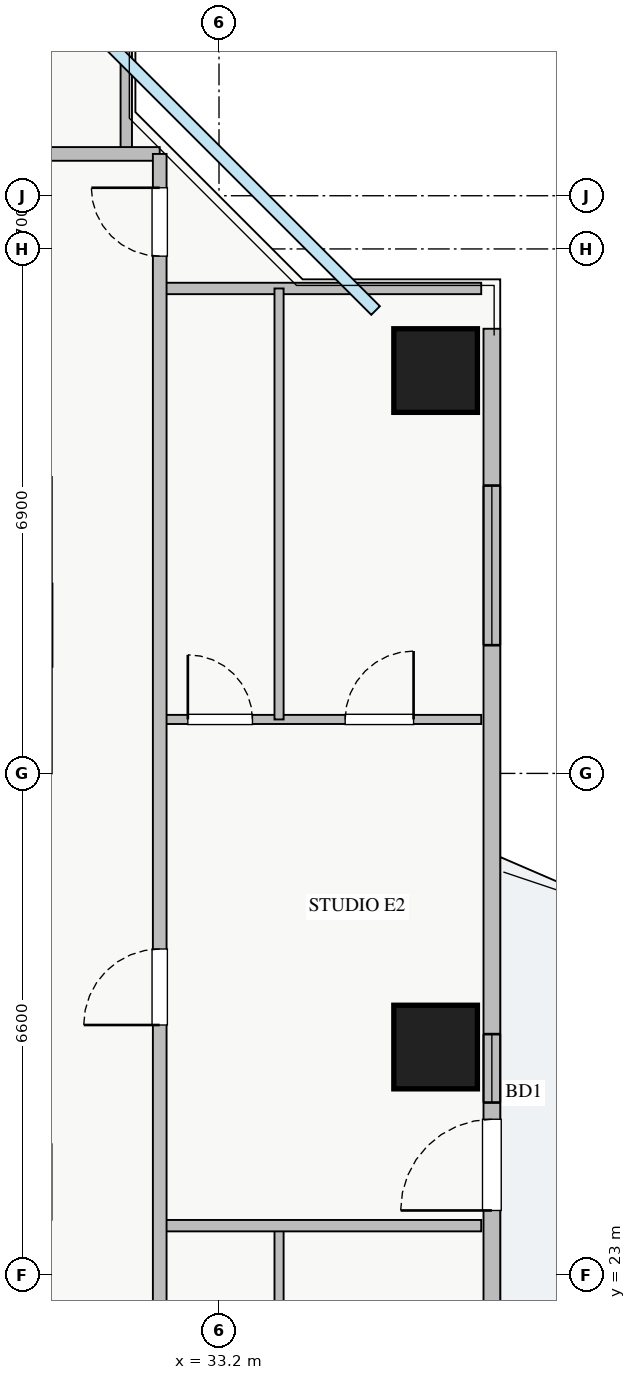
"""IFC4 building model, lengths in metres.
Left out: names, types, materials, properties, quantities, classifications, styles, units other than length and angle.
Written with IfcOpenShell. Run it as: python <this file> out.ifc"""

import sys

from ifc_helpers import new_model, si_unit, direction, frame, frame_2d, origin, origin_2d, place, context, subcontext, project, spatial, rectangle, extrude, source, transform, mapped, element, fill, save


model = new_model("IFC4")
c1 = context("Model", 3, precision=1e-05, world=origin(), true_north=direction((0.0, 1.0)))
c2 = subcontext(c1, "Body", "Model", "MODEL_VIEW")
j1 = project(units=[si_unit("LENGTHUNIT", "METRE"), si_unit("PLANEANGLEUNIT", "RADIAN")], contexts=[c1])
p1 = place(None, origin())
s1 = spatial("IfcSite", under=j1, at=p1, CompositionType="ELEMENT")
p2 = place(p1, origin())
s2 = spatial("IfcBuilding", under=s1, at=p2, CompositionType="ELEMENT")
p3 = place(p2, frame((0.0, 0.0, 119.75)))
s3 = spatial("IfcBuildingStorey", under=s2, at=p3, CompositionType="ELEMENT", Elevation=119.75)
m1 = source(origin(), c2, "Body", "SweptSolid", [
    extrude(rectangle(XDim=1.1, YDim=1.1, at=origin_2d()), origin(), (0.0, 0.0, 1.0), 3.25),
])
for number, where, z_axis, x_axis in (
    (1, (36.05, 26.0, 0.0), (0.0, 0.0, 1.0), (1.0, 0.0, 0.0)),
    (2, (36.05, 34.9, 0.0), (0.0, 0.0, 1.0), (1.0, 0.0, 0.0)),
):
    element("IfcColumn", number, at=place(p3, frame(where, z_axis=z_axis, x_axis=x_axis)), inside=s3, PredefinedType="COLUMN", context=c2, shape_type="MappedRepresentation", body=[
        mapped(m1, transform((0.0, 0.0, 0.0), x_axis=(1.0, 0.0, 0.0), y_axis=(0.0, 1.0, 0.0), z_axis=(0.0, 0.0, 1.0), scale=1.0)),
    ])
p4 = place(p3, frame((36.79, 10.55, 0.0), z_axis=(0.0, 0.0, 1.0), x_axis=(0.0, 1.0, 0.0)))
e3 = element("IfcWall", 3, at=p4, inside=s3, PredefinedType="STANDARD", context=c2, shape_type="SweptSolid", body=[
    extrude(rectangle(XDim=24.9, YDim=0.22, at=frame_2d((12.45, 0.0))), origin(), (0.0, 0.0, 1.0), 2.61),
])
p5 = place(p4, frame((13.3, 0.0, 0.0)))
e4 = element("IfcOpeningElement", 4, at=p5, cuts=e3, PredefinedType="OPENING", context=c2, shape_type="SweptSolid", body=[
    extrude(rectangle(XDim=1.2, YDim=2.1, at=frame_2d((0.6, 1.05))), frame((0.0, 0.12, 0.0), z_axis=(0.0, -1.0, 0.0), x_axis=(1.0, 0.0, 0.0)), (0.0, 0.0, 1.0), 0.24),
])
p6 = place(p4, frame((1.912, 0.0, 0.9)))
e5 = element("IfcOpeningElement", 5, at=p6, cuts=e3, PredefinedType="OPENING", context=c2, shape_type="SweptSolid", body=[
    extrude(rectangle(XDim=2.4, YDim=1.48, at=frame_2d((1.2, 0.74))), frame((0.0, 0.12, 0.0), z_axis=(0.0, -1.0, 0.0), x_axis=(1.0, 0.0, 0.0)), (0.0, 0.0, 1.0), 0.24),
])
p7 = place(p4, frame((20.737, 0.0, 0.9)))
e6 = element("IfcOpeningElement", 6, at=p7, cuts=e3, PredefinedType="OPENING", context=c2, shape_type="SweptSolid", body=[
    extrude(rectangle(XDim=2.1, YDim=1.48, at=frame_2d((1.05, 0.74))), frame((0.0, 0.12, 0.0), z_axis=(0.0, -1.0, 0.0), x_axis=(1.0, 0.0, 0.0)), (0.0, 0.0, 1.0), 0.24),
])
p8 = place(p4, frame((14.72, 0.0, 0.9)))
e7 = element("IfcOpeningElement", 7, at=p8, cuts=e3, PredefinedType="OPENING", context=c2, shape_type="SweptSolid", body=[
    extrude(rectangle(XDim=0.9, YDim=1.2, at=frame_2d((0.45, 0.6))), frame((0.0, 0.12, 0.0), z_axis=(0.0, -1.0, 0.0), x_axis=(1.0, 0.0, 0.0)), (0.0, 0.0, 1.0), 0.24),
])
p9 = place(p3, frame((31.98, 37.75, 0.0), z_axis=(0.0, 0.0, 1.0), x_axis=(0.0, 1.0, 0.0)))
e8 = element("IfcWall", 8, at=p9, inside=s3, PredefinedType="PARTITIONING", context=c2, shape_type="SweptSolid", body=[
    extrude(rectangle(XDim=2.9, YDim=0.15, at=frame_2d((1.45, 0.0))), origin(), (0.0, 0.0, 1.0), 3.07),
])
p10 = place(p3, frame((8.85, 37.75, 0.0), z_axis=(0.0, 0.0, 1.0), x_axis=(1.0, 0.0, 0.0)))
e9 = element("IfcWall", 9, at=p10, inside=s3, PredefinedType="PARTITIONING", context=c2, shape_type="SweptSolid", body=[
    extrude(rectangle(XDim=23.57, YDim=0.18, at=frame_2d((11.785, 0.0))), origin(), (0.0, 0.0, 1.0), 3.07),
])
p11 = place(p10, frame((2.035, 0.0, 0.0)))
e10 = element("IfcOpeningElement", 10, at=p11, cuts=e9, PredefinedType="OPENING", context=c2, shape_type="SweptSolid", body=[
    extrude(rectangle(XDim=1.0, YDim=2.05, at=frame_2d((0.5, 1.025))), frame((0.0, 0.1, 0.0), z_axis=(0.0, -1.0, 0.0), x_axis=(1.0, 0.0, 0.0)), (0.0, 0.0, 1.0), 0.2),
])
p12 = place(p10, frame((7.16, 0.0, 0.0)))
e11 = element("IfcOpeningElement", 11, at=p12, cuts=e9, PredefinedType="OPENING", context=c2, shape_type="SweptSolid", body=[
    extrude(rectangle(XDim=1.0, YDim=2.05, at=frame_2d((0.5, 1.025))), frame((0.0, 0.1, 0.0), z_axis=(0.0, -1.0, 0.0), x_axis=(1.0, 0.0, 0.0)), (0.0, 0.0, 1.0), 0.2),
])
p13 = place(p10, frame((13.3, 0.0, 0.0)))
e12 = element("IfcOpeningElement", 12, at=p13, cuts=e9, PredefinedType="OPENING", context=c2, shape_type="SweptSolid", body=[
    extrude(rectangle(XDim=1.0, YDim=2.05, at=frame_2d((0.5, 1.025))), frame((0.0, 0.1, 0.0), z_axis=(0.0, -1.0, 0.0), x_axis=(1.0, 0.0, 0.0)), (0.0, 0.0, 1.0), 0.2),
])
p14 = place(p10, frame((19.74, 0.0, 0.0)))
e13 = element("IfcOpeningElement", 13, at=p14, cuts=e9, PredefinedType="OPENING", context=c2, shape_type="SweptSolid", body=[
    extrude(rectangle(XDim=1.0, YDim=2.05, at=frame_2d((0.5, 1.025))), frame((0.0, 0.1, 0.0), z_axis=(0.0, -1.0, 0.0), x_axis=(1.0, 0.0, 0.0)), (0.0, 0.0, 1.0), 0.2),
])
p15 = place(p3, frame((32.42, 35.98, 0.0), z_axis=(0.0, 0.0, 1.0), x_axis=(1.0, 0.0, 0.0)))
e14 = element("IfcWall", 14, at=p15, inside=s3, PredefinedType="PARTITIONING", context=c2, shape_type="SweptSolid", body=[
    extrude(rectangle(XDim=4.23, YDim=0.15, at=frame_2d((2.115, 0.0))), origin(), (0.0, 0.0, 1.0), 3.07),
])
p16 = place(p3, frame((33.99, 17.38, 0.0), z_axis=(0.0, 0.0, 1.0), x_axis=(0.0, 1.0, 0.0)))
e15 = element("IfcWall", 15, at=p16, inside=s3, PredefinedType="PLUMBINGWALL", context=c2, shape_type="SweptSolid", body=[
    extrude(rectangle(XDim=6.27, YDim=0.12, at=frame_2d((3.135, 0.0))), origin(), (0.0, 0.0, 1.0), 3.07),
])
p17 = place(p3, frame((32.42, 30.31, 0.0), z_axis=(0.0, 0.0, 1.0), x_axis=(1.0, 0.0, 0.0)))
e16 = element("IfcWall", 16, at=p17, inside=s3, PredefinedType="PLUMBINGWALL", context=c2, shape_type="SweptSolid", body=[
    extrude(rectangle(XDim=4.23, YDim=0.12, at=frame_2d((2.115, 0.0))), origin(), (0.0, 0.0, 1.0), 3.07),
])
p18 = place(p17, frame((0.37, 0.0, 0.0)))
e17 = element("IfcOpeningElement", 17, at=p18, cuts=e16, PredefinedType="OPENING", context=c2, shape_type="SweptSolid", body=[
    extrude(rectangle(XDim=0.85, YDim=2.05, at=frame_2d((0.425, 1.025))), frame((0.0, 0.07, 0.0), z_axis=(0.0, -1.0, 0.0), x_axis=(1.0, 0.0, 0.0)), (0.0, 0.0, 1.0), 0.14),
])
p19 = place(p17, frame((2.44, 0.0, 0.0)))
e18 = element("IfcOpeningElement", 18, at=p19, cuts=e16, PredefinedType="OPENING", context=c2, shape_type="SweptSolid", body=[
    extrude(rectangle(XDim=0.9, YDim=2.05, at=frame_2d((0.45, 1.025))), frame((0.0, 0.07, 0.0), z_axis=(0.0, -1.0, 0.0), x_axis=(1.0, 0.0, 0.0)), (0.0, 0.0, 1.0), 0.14),
])
p20 = place(p3, frame((33.99, 30.31, 0.0), z_axis=(0.0, 0.0, 1.0), x_axis=(0.0, 1.0, 0.0)))
e19 = element("IfcWall", 19, at=p20, inside=s3, PredefinedType="PLUMBINGWALL", context=c2, shape_type="SweptSolid", body=[
    extrude(rectangle(XDim=5.67, YDim=0.12, at=frame_2d((2.835, 0.0))), origin(), (0.0, 0.0, 1.0), 3.07),
])
p21 = place(p3, frame((32.42, 23.65, 0.0), z_axis=(0.0, 0.0, 1.0), x_axis=(1.0, 0.0, 0.0)))
e20 = element("IfcWall", 20, at=p21, inside=s3, PredefinedType="PARTITIONING", context=c2, shape_type="SweptSolid", body=[
    extrude(rectangle(XDim=4.23, YDim=0.15, at=frame_2d((2.115, 0.0))), origin(), (0.0, 0.0, 1.0), 3.07),
])
p22 = place(p3, frame((32.42, 8.25, 0.0), z_axis=(0.0, 0.0, 1.0), x_axis=(0.0, 1.0, 0.0)))
e21 = element("IfcWall", 21, at=p22, inside=s3, PredefinedType="PARTITIONING", context=c2, shape_type="SweptSolid", body=[
    extrude(rectangle(XDim=29.5, YDim=0.18, at=frame_2d((14.75, 0.0))), origin(), (0.0, 0.0, 1.0), 3.07),
])
p23 = place(p22, frame((28.155, 0.0, 0.0)))
e22 = element("IfcOpeningElement", 22, at=p23, cuts=e21, PredefinedType="OPENING", context=c2, shape_type="SweptSolid", body=[
    extrude(rectangle(XDim=0.9, YDim=2.05, at=frame_2d((0.45, 1.025))), frame((0.0, 0.1, 0.0), z_axis=(0.0, -1.0, 0.0), x_axis=(1.0, 0.0, 0.0)), (0.0, 0.0, 1.0), 0.2),
])
p24 = place(p22, frame((0.445, 0.0, 0.0)))
e23 = element("IfcOpeningElement", 23, at=p24, cuts=e21, PredefinedType="OPENING", context=c2, shape_type="SweptSolid", body=[
    extrude(rectangle(XDim=0.9, YDim=2.05, at=frame_2d((0.45, 1.025))), frame((0.0, 0.1, 0.0), z_axis=(0.0, -1.0, 0.0), x_axis=(1.0, 0.0, 0.0)), (0.0, 0.0, 1.0), 0.2),
])
p25 = place(p22, frame((4.76, 0.0, 0.0)))
e24 = element("IfcOpeningElement", 24, at=p25, cuts=e21, PredefinedType="OPENING", context=c2, shape_type="SweptSolid", body=[
    extrude(rectangle(XDim=1.0, YDim=2.05, at=frame_2d((0.5, 1.025))), frame((0.0, 0.1, 0.0), z_axis=(0.0, -1.0, 0.0), x_axis=(1.0, 0.0, 0.0)), (0.0, 0.0, 1.0), 0.2),
])
p26 = place(p22, frame((18.04, 0.0, 0.0)))
e25 = element("IfcOpeningElement", 25, at=p26, cuts=e21, PredefinedType="OPENING", context=c2, shape_type="SweptSolid", body=[
    extrude(rectangle(XDim=1.0, YDim=2.05, at=frame_2d((0.5, 1.025))), frame((0.0, 0.1, 0.0), z_axis=(0.0, -1.0, 0.0), x_axis=(1.0, 0.0, 0.0)), (0.0, 0.0, 1.0), 0.2),
])
m2 = source(origin(), c2, "Body", "SweptSolid", [
    extrude(rectangle(XDim=1.2, YDim=2.1, at=frame_2d((0.6, 1.05))), frame((0.0, 0.025, 0.0), z_axis=(0.0, -1.0, 0.0), x_axis=(1.0, 0.0, 0.0)), (0.0, 0.0, 1.0), 0.05),
])
p27 = place(p5, origin())
e26 = element("IfcDoor", 26, at=p27, inside=s3, OperationType="SINGLE_SWING_LEFT", PredefinedType="DOOR", context=c2, shape_type="MappedRepresentation", body=[
    mapped(m2, transform((0.0, 0.0, 0.0), x_axis=(1.0, 0.0, 0.0), y_axis=(0.0, 1.0, 0.0), z_axis=(0.0, 0.0, 1.0), scale=1.0)),
])
fill(e4, e26)
m3 = source(origin(), c2, "Body", "SweptSolid", [
    extrude(rectangle(XDim=2.1, YDim=1.48, at=frame_2d((1.05, 0.74))), frame((0.0, 0.03, 0.0), z_axis=(0.0, -1.0, 0.0), x_axis=(1.0, 0.0, 0.0)), (0.0, 0.0, 1.0), 0.06),
])
p28 = place(p7, origin())
e27 = element("IfcWindow", 27, at=p28, inside=s3, PartitioningType="TRIPLE_PANEL_VERTICAL", PredefinedType="WINDOW", context=c2, shape_type="MappedRepresentation", body=[
    mapped(m3, transform((0.0, 0.0, 0.0), x_axis=(1.0, 0.0, 0.0), y_axis=(0.0, 1.0, 0.0), z_axis=(0.0, 0.0, 1.0), scale=1.0)),
])
fill(e6, e27)
m4 = source(origin(), c2, "Body", "SweptSolid", [
    extrude(rectangle(XDim=0.85, YDim=2.05, at=frame_2d((0.425, 1.025))), frame((0.0, 0.025, 0.0), z_axis=(0.0, -1.0, 0.0), x_axis=(1.0, 0.0, 0.0)), (0.0, 0.0, 1.0), 0.05),
])
p29 = place(p18, origin())
e28 = element("IfcDoor", 28, at=p29, inside=s3, OperationType="SINGLE_SWING_LEFT", PredefinedType="DOOR", context=c2, shape_type="MappedRepresentation", body=[
    mapped(m4, transform((0.0, 0.0, 0.0), x_axis=(1.0, 0.0, 0.0), y_axis=(0.0, 1.0, 0.0), z_axis=(0.0, 0.0, 1.0), scale=1.0)),
])
fill(e17, e28)
m5 = source(origin(), c2, "Body", "SweptSolid", [
    extrude(rectangle(XDim=0.9, YDim=2.05, at=frame_2d((0.45, 1.025))), frame((0.0, 0.025, 0.0), z_axis=(0.0, -1.0, 0.0), x_axis=(1.0, 0.0, 0.0)), (0.0, 0.0, 1.0), 0.05),
])
p30 = place(p19, origin())
e29 = element("IfcDoor", 29, at=p30, inside=s3, OperationType="SINGLE_SWING_RIGHT", PredefinedType="DOOR", context=c2, shape_type="MappedRepresentation", body=[
    mapped(m5, transform((0.0, 0.0, 0.0), x_axis=(1.0, 0.0, 0.0), y_axis=(0.0, 1.0, 0.0), z_axis=(0.0, 0.0, 1.0), scale=1.0)),
])
fill(e18, e29)
p31 = place(p23, origin())
e30 = element("IfcDoor", 30, at=p31, inside=s3, OperationType="SINGLE_SWING_RIGHT", PredefinedType="DOOR", context=c2, shape_type="MappedRepresentation", body=[
    mapped(m5, transform((0.0, 0.0, 0.0), x_axis=(1.0, 0.0, 0.0), y_axis=(0.0, 1.0, 0.0), z_axis=(0.0, 0.0, 1.0), scale=1.0)),
])
fill(e22, e30)
m6 = source(origin(), c2, "Body", "SweptSolid", [
    extrude(rectangle(XDim=1.0, YDim=2.05, at=frame_2d((0.5, 1.025))), frame((0.0, 0.025, 0.0), z_axis=(0.0, -1.0, 0.0), x_axis=(1.0, 0.0, 0.0)), (0.0, 0.0, 1.0), 0.05),
])
p32 = place(p26, origin())
e31 = element("IfcDoor", 31, at=p32, inside=s3, OperationType="SINGLE_SWING_LEFT", PredefinedType="DOOR", context=c2, shape_type="MappedRepresentation", body=[
    mapped(m6, transform((0.0, 0.0, 0.0), x_axis=(1.0, 0.0, 0.0), y_axis=(0.0, 1.0, 0.0), z_axis=(0.0, 0.0, 1.0), scale=1.0)),
])
fill(e25, e31)
m7 = source(origin(), c2, "Body", "SweptSolid", [
    extrude(rectangle(XDim=0.9, YDim=1.2, at=frame_2d((0.45, 0.6))), frame((0.0, 0.03, 0.0), z_axis=(0.0, -1.0, 0.0), x_axis=(1.0, 0.0, 0.0)), (0.0, 0.0, 1.0), 0.06),
])
p33 = place(p8, origin())
e32 = element("IfcWindow", 32, at=p33, inside=s3, PartitioningType="SINGLE_PANEL", PredefinedType="WINDOW", context=c2, shape_type="MappedRepresentation", body=[
    mapped(m7, transform((0.0, 0.0, 0.0), x_axis=(1.0, 0.0, 0.0), y_axis=(0.0, 1.0, 0.0), z_axis=(0.0, 0.0, 1.0), scale=1.0)),
])
fill(e7, e32)
save(model, sys.argv[1])
